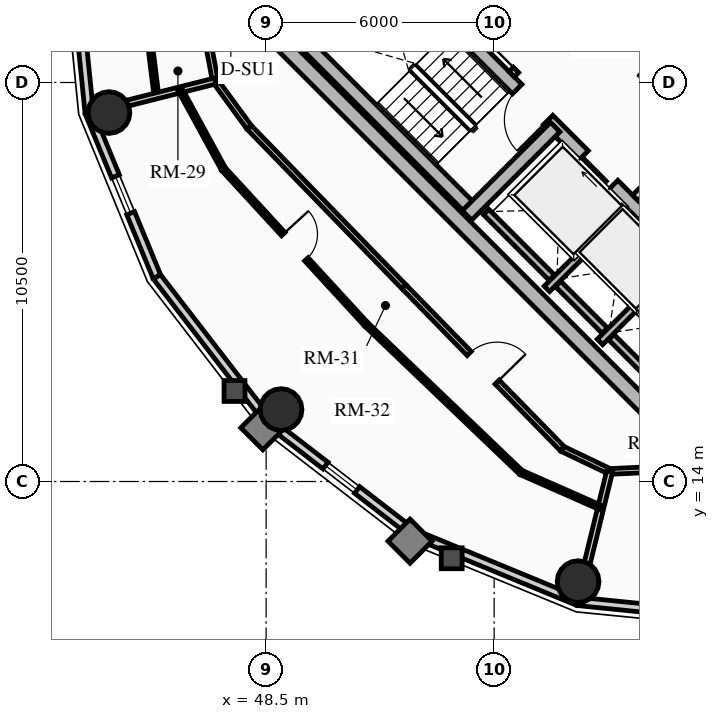
"""IFC4 building model, lengths in metres.
Left out: names, types, materials, properties, quantities, classifications, styles, units other than length and angle.
Written with IfcOpenShell. Run it as: python <this file> out.ifc"""

import sys

from ifc_helpers import new_model, si_unit, direction, frame, frame_2d, origin, origin_2d, place, context, subcontext, project, spatial, rectangle, circle, extrude, source, transform, mapped, element, fill, save


model = new_model("IFC4")
c1 = context("Model", 3, precision=1e-05, world=origin(), true_north=direction((0.0, 1.0)))
c2 = subcontext(c1, "Body", "Model", "MODEL_VIEW")
j1 = project(units=[si_unit("LENGTHUNIT", "METRE"), si_unit("PLANEANGLEUNIT", "RADIAN")], contexts=[c1])
p1 = place(None, origin())
s1 = spatial("IfcSite", under=j1, at=p1, CompositionType="ELEMENT")
p2 = place(p1, origin())
s2 = spatial("IfcBuilding", under=s1, at=p2, CompositionType="ELEMENT")
p3 = place(p2, frame((0.0, 0.0, 214.12)))
s3 = spatial("IfcBuildingStorey", under=s2, at=p3, CompositionType="ELEMENT", Elevation=214.12)
for number, where, z_axis, x_axis in (
    (1, (58.702, 15.732, 0.0), (0.0, 0.0, 1.0), (-0.707, 0.707, 0.0)),
    (2, (66.268, 23.298, 0.0), (0.0, 0.0, 1.0), (-0.707, 0.707, 0.0)),
):
    element("IfcWall", number, at=place(p3, frame(where, z_axis=z_axis, x_axis=x_axis)), inside=s3, PredefinedType="SHEAR", context=c2, shape_type="SweptSolid", body=[
        extrude(rectangle(XDim=14.1, YDim=0.4, at=frame_2d((7.05, 0.0))), origin(), (0.0, 0.0, 1.0), 2.91),
    ])
p4 = place(p3, frame((61.06, 18.373, 0.0), z_axis=(0.0, 0.0, 1.0), x_axis=(-0.707106781187, 0.707106781187, 0.0)))
e3 = element("IfcWall", 3, at=p4, inside=s3, PredefinedType="SHEAR", context=c2, shape_type="SweptSolid", body=[
    extrude(rectangle(XDim=13.7, YDim=0.35, at=frame_2d((6.85, 0.0))), origin(), (0.0, 0.0, 1.0), 2.91),
])
m1 = source(origin(), c2, "Body", "SweptSolid", [
    extrude(rectangle(XDim=1.1, YDim=2.015, at=frame_2d((0.55, 1.007))), frame((0.0, 0.185, 0.0), z_axis=(0.0, -1.0, 0.0), x_axis=(1.0, 0.0, 0.0)), (0.0, 0.0, 1.0), 0.37),
])
p5 = place(p4, frame((4.85, 0.0, 0.0)))
e4 = element("IfcOpeningElement", 4, at=p5, cuts=e3, PredefinedType="OPENING", context=c2, shape_type="MappedRepresentation", body=[
    mapped(m1, transform((0.0, 0.0, 0.0), x_axis=(1.0, 0.0, 0.0), y_axis=(0.0, 1.0, 0.0), z_axis=(0.0, 0.0, 1.0), scale=1.0)),
])
p6 = place(p4, frame((0.625, 0.0, 0.0)))
e5 = element("IfcOpeningElement", 5, at=p6, cuts=e3, PredefinedType="OPENING", context=c2, shape_type="MappedRepresentation", body=[
    mapped(m1, transform((0.0, 0.0, 0.0), x_axis=(1.0, 0.0, 0.0), y_axis=(0.0, 1.0, 0.0), z_axis=(0.0, 0.0, 1.0), scale=1.0)),
])
p7 = place(p4, frame((2.625, 0.0, 0.0)))
e6 = element("IfcOpeningElement", 6, at=p7, cuts=e3, PredefinedType="OPENING", context=c2, shape_type="MappedRepresentation", body=[
    mapped(m1, transform((0.0, 0.0, 0.0), x_axis=(1.0, 0.0, 0.0), y_axis=(0.0, 1.0, 0.0), z_axis=(0.0, 0.0, 1.0), scale=1.0)),
])
m2 = source(origin(), c2, "Body", "SweptSolid", [
    extrude(rectangle(XDim=1.15, YDim=2.02, at=frame_2d((0.575, 1.01))), frame((0.0, 0.185, 0.0), z_axis=(0.0, -1.0, 0.0), x_axis=(1.0, 0.0, 0.0)), (0.0, 0.0, 1.0), 0.37),
])
p8 = place(p4, frame((7.27, 0.0, 0.0)))
e7 = element("IfcOpeningElement", 7, at=p8, cuts=e3, PredefinedType="OPENING", context=c2, shape_type="MappedRepresentation", body=[
    mapped(m2, transform((0.0, 0.0, 0.0), x_axis=(1.0, 0.0, 0.0), y_axis=(0.0, 1.0, 0.0), z_axis=(0.0, 0.0, 1.0), scale=1.0)),
])
p9 = place(p3, frame((63.627, 20.94, 0.0), z_axis=(0.0, 0.0, 1.0), x_axis=(-0.707119496762, 0.707094065383, 0.0)))
e8 = element("IfcWall", 8, at=p9, inside=s3, PredefinedType="SHEAR", context=c2, shape_type="SweptSolid", body=[
    extrude(rectangle(XDim=9.6, YDim=0.35, at=frame_2d((4.8, 0.0))), origin(), (0.0, 0.0, 1.0), 2.91),
])
p10 = place(p9, frame((5.28, 0.0, 0.0)))
e9 = element("IfcOpeningElement", 9, at=p10, cuts=e8, PredefinedType="OPENING", context=c2, shape_type="MappedRepresentation", body=[
    mapped(m2, transform((0.0, 0.0, 0.0), x_axis=(1.0, 0.0, 0.0), y_axis=(0.0, 1.0, 0.0), z_axis=(0.0, 0.0, 1.0), scale=1.0)),
])
p11 = place(p3, frame((53.922, 21.141, 0.0), z_axis=(0.0, 0.0, 1.0), x_axis=(-0.707106781187, 0.707106781187, 0.0)))
e10 = element("IfcWall", 10, at=p11, inside=s3, PredefinedType="SHEAR", context=c2, shape_type="SweptSolid", body=[
    extrude(rectangle(XDim=6.695, YDim=0.35, at=frame_2d((3.348, 0.0))), origin(), (0.0, 0.0, 1.0), 2.91),
])
p12 = place(p3, frame((53.784, 21.003, 0.0), z_axis=(0.0, 0.0, 1.0), x_axis=(0.707106781187, 0.707106781187, 0.0)))
e11 = element("IfcWall", 11, at=p12, inside=s3, PredefinedType="SHEAR", context=c2, shape_type="SweptSolid", body=[
    extrude(rectangle(XDim=3.285, YDim=0.35, at=frame_2d((1.643, 0.0))), origin(), (0.0, 0.0, 1.0), 2.91),
])
for number, where, z_axis, x_axis in (
    (12, (44.365, 23.709, 0.0), (0.0, 0.0, 1.0), (1.0, 0.0, 0.0)),
    (13, (48.893, 15.893, 0.0), (0.0, 0.0, 1.0), (1.0, 0.0, 0.0)),
    (14, (56.709, 11.365, 0.0), (0.0, 0.0, 1.0), (1.0, 0.0, 0.0)),
):
    element("IfcColumn", number, at=place(p3, frame(where, z_axis=z_axis, x_axis=x_axis)), inside=s3, PredefinedType="USERDEFINED", context=c2, shape_type="SweptSolid", body=[
        extrude(circle(Radius=0.55, at=origin_2d()), origin(), (0.0, 0.0, 1.0), 2.91),
    ])
p13 = place(p3, frame((43.845, 23.705, 0.0), z_axis=(0.0, 0.0, 1.0), x_axis=(-0.100570534541, 0.994929930991, 0.0)))
e15 = element("IfcWall", 15, at=p13, inside=s3, PredefinedType="SOLIDWALL", context=c2, shape_type="SweptSolid", body=[
    extrude(rectangle(XDim=4.418, YDim=0.22, at=frame_2d((2.209, 0.0))), origin(), (0.0, 0.0, 1.0), 2.322),
])
m3 = source(origin(), c2, "Body", "SweptSolid", [
    extrude(rectangle(XDim=1.05, YDim=1.3, at=frame_2d((0.525, 0.65))), frame((0.0, 0.12, 0.0), z_axis=(0.0, -1.0, 0.0), x_axis=(1.0, 0.0, 0.0)), (0.0, 0.0, 1.0), 0.24),
])
p14 = place(p13, frame((1.684, 0.0, 0.65)))
e16 = element("IfcOpeningElement", 16, at=p14, cuts=e15, PredefinedType="OPENING", context=c2, shape_type="MappedRepresentation", body=[
    mapped(m3, transform((0.0, 0.0, 0.0), x_axis=(1.0, 0.0, 0.0), y_axis=(0.0, 1.0, 0.0), z_axis=(0.0, 0.0, 1.0), scale=1.0)),
])
p15 = place(p3, frame((45.626, 19.387, 0.0), z_axis=(0.0, 0.0, 1.0), x_axis=(-0.381309704956, 0.924447353237, 0.0)))
e17 = element("IfcWall", 17, at=p15, inside=s3, PredefinedType="SOLIDWALL", context=c2, shape_type="SweptSolid", body=[
    extrude(rectangle(XDim=4.671, YDim=0.22, at=frame_2d((2.335, 0.0))), origin(), (0.0, 0.0, 1.0), 2.322),
])
p16 = place(p15, frame((1.81, 0.0, 0.65)))
e18 = element("IfcOpeningElement", 18, at=p16, cuts=e17, PredefinedType="OPENING", context=c2, shape_type="MappedRepresentation", body=[
    mapped(m3, transform((0.0, 0.0, 0.0), x_axis=(1.0, 0.0, 0.0), y_axis=(0.0, 1.0, 0.0), z_axis=(0.0, 0.0, 1.0), scale=1.0)),
])
p17 = place(p3, frame((48.569, 15.569, 0.0), z_axis=(0.0, 0.0, 1.0), x_axis=(-0.610523083886, 0.791998462147, 0.0)))
e19 = element("IfcWall", 19, at=p17, inside=s3, PredefinedType="SOLIDWALL", context=c2, shape_type="SweptSolid", body=[
    extrude(rectangle(XDim=4.82, YDim=0.22, at=frame_2d((2.41, 0.0))), origin(), (0.0, 0.0, 1.0), 2.322),
])
p18 = place(p3, frame((52.387, 12.626, 0.0), z_axis=(0.0, 0.0, 1.0), x_axis=(-0.791998462147, 0.610523083886, 0.0)))
e20 = element("IfcWall", 20, at=p18, inside=s3, PredefinedType="SOLIDWALL", context=c2, shape_type="SweptSolid", body=[
    extrude(rectangle(XDim=4.82, YDim=0.22, at=frame_2d((2.41, 0.0))), origin(), (0.0, 0.0, 1.0), 2.322),
])
p19 = place(p18, frame((1.885, 0.0, 0.65)))
e21 = element("IfcOpeningElement", 21, at=p19, cuts=e20, PredefinedType="OPENING", context=c2, shape_type="MappedRepresentation", body=[
    mapped(m3, transform((0.0, 0.0, 0.0), x_axis=(1.0, 0.0, 0.0), y_axis=(0.0, 1.0, 0.0), z_axis=(0.0, 0.0, 1.0), scale=1.0)),
])
p20 = place(p3, frame((56.705, 10.845, 0.0), z_axis=(0.0, 0.0, 1.0), x_axis=(-0.924447353237, 0.381309704956, 0.0)))
e22 = element("IfcWall", 22, at=p20, inside=s3, PredefinedType="SOLIDWALL", context=c2, shape_type="SweptSolid", body=[
    extrude(rectangle(XDim=4.671, YDim=0.22, at=frame_2d((2.335, 0.0))), origin(), (0.0, 0.0, 1.0), 2.322),
])
p21 = place(p3, frame((61.1, 10.401, 0.0), z_axis=(0.0, 0.0, 1.0), x_axis=(-0.994929930991, 0.100570534541, 0.0)))
e23 = element("IfcWall", 23, at=p21, inside=s3, PredefinedType="SOLIDWALL", context=c2, shape_type="SweptSolid", body=[
    extrude(rectangle(XDim=4.418, YDim=0.22, at=frame_2d((2.209, 0.0))), origin(), (0.0, 0.0, 1.0), 2.322),
])
p22 = place(p21, frame((1.684, 0.0, 0.65)))
e24 = element("IfcOpeningElement", 24, at=p22, cuts=e23, PredefinedType="OPENING", context=c2, shape_type="MappedRepresentation", body=[
    mapped(m3, transform((0.0, 0.0, 0.0), x_axis=(1.0, 0.0, 0.0), y_axis=(0.0, 1.0, 0.0), z_axis=(0.0, 0.0, 1.0), scale=1.0)),
])
p23 = place(p3, frame((55.888, 19.069, 0.0), z_axis=(0.0, 0.0, 1.0), x_axis=(0.707106781187, 0.707106781187, 0.0)))
e25 = element("IfcWall", 25, at=p23, inside=s3, PredefinedType="SHEAR", context=c2, shape_type="SweptSolid", body=[
    extrude(rectangle(XDim=2.97, YDim=0.2, at=frame_2d((1.485, 0.0))), origin(), (0.0, 0.0, 1.0), 2.91),
])
p24 = place(p3, frame((56.015, 19.366, 0.0), z_axis=(0.0, 0.0, 1.0), x_axis=(-0.707106781187, 0.707106781187, 0.0)))
e26 = element("IfcWall", 26, at=p24, inside=s3, PredefinedType="SHEAR", context=c2, shape_type="SweptSolid", body=[
    extrude(rectangle(XDim=2.44, YDim=0.2, at=frame_2d((1.22, 0.0))), origin(), (0.0, 0.0, 1.0), 2.91),
])
p25 = place(p3, frame((57.284, 17.673, 0.0), z_axis=(0.0, 0.0, 1.0), x_axis=(0.707147878904, 0.70706568108, 0.0)))
e27 = element("IfcWall", 27, at=p25, inside=s3, PredefinedType="SHEAR", context=c2, shape_type="SweptSolid", body=[
    extrude(rectangle(XDim=2.97, YDim=0.2, at=frame_2d((1.485, 0.0))), origin(), (0.0, 0.0, 1.0), 2.91),
])
p26 = place(p3, frame((57.412, 17.97, 0.0), z_axis=(0.0, 0.0, 1.0), x_axis=(-0.707106781187, 0.707106781187, 0.0)))
e28 = element("IfcWall", 28, at=p26, inside=s3, PredefinedType="SHEAR", context=c2, shape_type="SweptSolid", body=[
    extrude(rectangle(XDim=1.735, YDim=0.2, at=frame_2d((0.867, 0.0))), origin(), (0.0, 0.0, 1.0), 2.91),
])
p27 = place(p3, frame((58.737, 16.644, 0.0), z_axis=(0.0, 0.0, 1.0), x_axis=(-0.707032117043, 0.707181437447, 0.0)))
e29 = element("IfcWall", 29, at=p27, inside=s3, PredefinedType="SHEAR", context=c2, shape_type="SweptSolid", body=[
    extrude(rectangle(XDim=1.635, YDim=0.2, at=frame_2d((0.817, 0.0))), origin(), (0.0, 0.0, 1.0), 2.91),
])
p28 = place(p3, frame((58.214, 21.467, 0.0), z_axis=(0.0, 0.0, 1.0), x_axis=(0.707106781187, 0.707106781187, 0.0)))
e30 = element("IfcWall", 30, at=p28, inside=s3, PredefinedType="PARTITIONING", context=c2, shape_type="SweptSolid", body=[
    extrude(rectangle(XDim=3.28, YDim=0.2, at=frame_2d((1.64, 0.0))), origin(), (0.0, 0.0, 1.0), 2.685),
])
m4 = source(origin(), c2, "Body", "SweptSolid", [
    extrude(rectangle(XDim=1.5, YDim=2.02, at=frame_2d((0.75, 1.01))), frame((0.0, 0.11, 0.0), z_axis=(0.0, -1.0, 0.0), x_axis=(1.0, 0.0, 0.0)), (0.0, 0.0, 1.0), 0.22),
])
p29 = place(p28, frame((1.55, 0.0, 0.0)))
e31 = element("IfcOpeningElement", 31, at=p29, cuts=e30, PredefinedType="OPENING", context=c2, shape_type="MappedRepresentation", body=[
    mapped(m4, transform((0.0, 0.0, 0.0), x_axis=(1.0, 0.0, 0.0), y_axis=(0.0, 1.0, 0.0), z_axis=(0.0, 0.0, 1.0), scale=1.0)),
])
p30 = place(p3, frame((54.961, 24.719, 0.0), z_axis=(0.0, 0.0, 1.0), x_axis=(0.707106781187, 0.707106781187, 0.0)))
e32 = element("IfcWall", 32, at=p30, inside=s3, PredefinedType="PARTITIONING", context=c2, shape_type="SweptSolid", body=[
    extrude(rectangle(XDim=3.28, YDim=0.2, at=frame_2d((1.64, 0.0))), origin(), (0.0, 0.0, 1.0), 2.685),
])
m5 = source(origin(), c2, "Body", "SweptSolid", [
    extrude(rectangle(XDim=0.9, YDim=2.005, at=frame_2d((0.45, 1.002))), frame((0.0, 0.11, 0.0), z_axis=(0.0, -1.0, 0.0), x_axis=(1.0, 0.0, 0.0)), (0.0, 0.0, 1.0), 0.22),
])
p31 = place(p30, frame((0.16, 0.0, 0.0)))
e33 = element("IfcOpeningElement", 33, at=p31, cuts=e32, PredefinedType="OPENING", context=c2, shape_type="MappedRepresentation", body=[
    mapped(m5, transform((0.0, 0.0, 0.0), x_axis=(1.0, 0.0, 0.0), y_axis=(0.0, 1.0, 0.0), z_axis=(0.0, 0.0, 1.0), scale=1.0)),
])
p32 = place(p3, frame((46.912, 25.862, 0.0), z_axis=(0.0, 0.0, 1.0), x_axis=(0.186095172215, -0.98253172309, 0.0)))
e34 = element("IfcWall", 34, at=p32, inside=s3, PredefinedType="PARTITIONING", context=c2, shape_type="SweptSolid", body=[
    extrude(rectangle(XDim=1.346, YDim=0.15, at=frame_2d((0.673, 0.0))), origin(), (0.0, 0.0, 1.0), 2.322),
])
p33 = place(p3, frame((47.163, 24.54, 0.0), z_axis=(0.0, 0.0, 1.0), x_axis=(0.589711902124, -0.807613690135, 0.0)))
e35 = element("IfcWall", 35, at=p33, inside=s3, PredefinedType="PARTITIONING", context=c2, shape_type="SweptSolid", body=[
    extrude(rectangle(XDim=1.507, YDim=0.15, at=frame_2d((0.753, 0.0))), origin(), (0.0, 0.0, 1.0), 2.255),
])
p34 = place(p3, frame((48.052, 23.323, 0.0), z_axis=(0.0, 0.0, 1.0), x_axis=(0.696573981306, -0.717484974454, 0.0)))
e36 = element("IfcWall", 36, at=p34, inside=s3, PredefinedType="PARTITIONING", context=c2, shape_type="SweptSolid", body=[
    extrude(rectangle(XDim=5.849, YDim=0.15, at=frame_2d((2.925, 0.0))), origin(), (0.0, 0.0, 1.0), 2.685),
])
p35 = place(p3, frame((52.126, 19.126, 0.0), z_axis=(0.0, 0.0, 1.0), x_axis=(0.698979087027, -0.715142108884, 0.0)))
e37 = element("IfcWall", 37, at=p35, inside=s3, PredefinedType="PARTITIONING", context=c2, shape_type="SweptSolid", body=[
    extrude(rectangle(XDim=5.966, YDim=0.15, at=frame_2d((2.983, 0.0))), origin(), (0.0, 0.0, 1.0), 2.322),
])
m6 = source(origin(), c2, "Body", "SweptSolid", [
    extrude(rectangle(XDim=1.05, YDim=2.015, at=frame_2d((0.525, 1.007))), frame((0.0, 0.085, 0.0), z_axis=(0.0, -1.0, 0.0), x_axis=(1.0, 0.0, 0.0)), (0.0, 0.0, 1.0), 0.17),
])
p36 = place(p35, frame((2.458, 0.0, 0.0)))
e38 = element("IfcOpeningElement", 38, at=p36, cuts=e37, PredefinedType="OPENING", context=c2, shape_type="MappedRepresentation", body=[
    mapped(m6, transform((0.0, 0.0, 0.0), x_axis=(1.0, 0.0, 0.0), y_axis=(0.0, 1.0, 0.0), z_axis=(0.0, 0.0, 1.0), scale=1.0)),
])
p37 = place(p3, frame((56.296, 14.859, 0.0), z_axis=(0.0, 0.0, 1.0), x_axis=(0.90178292445, -0.432189260823, 0.0)))
e39 = element("IfcWall", 39, at=p37, inside=s3, PredefinedType="PARTITIONING", context=c2, shape_type="SweptSolid", body=[
    extrude(rectangle(XDim=1.377, YDim=0.15, at=frame_2d((0.688, 0.0))), origin(), (0.0, 0.0, 1.0), 2.255),
])
p38 = place(p3, frame((57.538, 14.264, 0.0), z_axis=(0.0, 0.0, 1.0), x_axis=(0.99892990172, 0.046249880546, 0.0)))
e40 = element("IfcWall", 40, at=p38, inside=s3, PredefinedType="PARTITIONING", context=c2, shape_type="SweptSolid", body=[
    extrude(rectangle(XDim=1.446, YDim=0.15, at=frame_2d((0.723, 0.0))), origin(), (0.0, 0.0, 1.0), 2.322),
])
p39 = place(p3, frame((47.163, 24.54, 0.0), z_axis=(0.0, 0.0, 1.0), x_axis=(-0.9696166611, -0.244629373781, 0.0)))
e41 = element("IfcWall", 41, at=p39, inside=s3, PredefinedType="PARTITIONING", context=c2, shape_type="SweptSolid", body=[
    extrude(rectangle(XDim=3.401, YDim=0.16, at=frame_2d((1.701, 0.0))), origin(), (0.0, 0.0, 1.0), 2.322),
])
p40 = place(p3, frame((57.538, 14.264, 0.0), z_axis=(0.0, 0.0, 1.0), x_axis=(-0.237377006249, -0.971417601706, 0.0)))
e42 = element("IfcWall", 42, at=p40, inside=s3, PredefinedType="PARTITIONING", context=c2, shape_type="SweptSolid", body=[
    extrude(rectangle(XDim=3.499, YDim=0.16, at=frame_2d((1.75, 0.0))), origin(), (0.0, 0.0, 1.0), 2.322),
])
p41 = place(p3, frame((45.328, 26.457, 0.0), z_axis=(0.0, 0.0, 1.0), x_axis=(0.122605181354, -0.992455525203, 0.0)))
e43 = element("IfcWall", 43, at=p41, inside=s3, PredefinedType="PARTITIONING", context=c2, shape_type="SweptSolid", body=[
    extrude(rectangle(XDim=2.228, YDim=0.125, at=frame_2d((1.114, 0.0))), origin(), (0.0, 0.0, 1.0), 2.322),
])
m7 = source(origin(), c2, "Body", "SweptSolid", [
    extrude(rectangle(XDim=0.9, YDim=2.005, at=frame_2d((0.45, 1.002))), frame((0.0, 0.073, 0.0), z_axis=(0.0, -1.0, 0.0), x_axis=(1.0, 0.0, 0.0)), (0.0, 0.0, 1.0), 0.145),
])
p42 = place(p41, frame((0.12, 0.0, 0.0)))
e44 = element("IfcOpeningElement", 44, at=p42, cuts=e43, PredefinedType="OPENING", context=c2, shape_type="MappedRepresentation", body=[
    mapped(m7, transform((0.0, 0.0, 0.0), x_axis=(1.0, 0.0, 0.0), y_axis=(0.0, 1.0, 0.0), z_axis=(0.0, 0.0, 1.0), scale=1.0)),
])
p43 = place(p3, frame((46.24, 24.307, 0.0), z_axis=(0.0, 0.0, 1.0), x_axis=(0.479212341296, -0.87769899849, 0.0)))
e45 = element("IfcWall", 45, at=p43, inside=s3, PredefinedType="PARTITIONING", context=c2, shape_type="SweptSolid", body=[
    extrude(rectangle(XDim=2.374, YDim=0.125, at=frame_2d((1.187, 0.0))), origin(), (0.0, 0.0, 1.0), 2.255),
])
p44 = place(p3, frame((47.377, 22.223, 0.0), z_axis=(0.0, 0.0, 1.0), x_axis=(0.676554417653, -0.736392639802, 0.0)))
e46 = element("IfcWall", 46, at=p44, inside=s3, PredefinedType="PARTITIONING", context=c2, shape_type="SweptSolid", body=[
    extrude(rectangle(XDim=5.553, YDim=0.125, at=frame_2d((2.776, 0.0))), origin(), (0.0, 0.0, 1.0), 2.685),
])
p45 = place(p44, frame((2.326, 0.0, 0.0)))
e47 = element("IfcOpeningElement", 47, at=p45, cuts=e46, PredefinedType="OPENING", context=c2, shape_type="MappedRepresentation", body=[
    mapped(m7, transform((0.0, 0.0, 0.0), x_axis=(1.0, 0.0, 0.0), y_axis=(0.0, 1.0, 0.0), z_axis=(0.0, 0.0, 1.0), scale=1.0)),
])
p46 = place(p3, frame((51.134, 18.134, 0.0), z_axis=(0.0, 0.0, 1.0), x_axis=(0.722450775654, -0.691422357721, 0.0)))
e48 = element("IfcWall", 48, at=p46, inside=s3, PredefinedType="PARTITIONING", context=c2, shape_type="SweptSolid", body=[
    extrude(rectangle(XDim=5.634, YDim=0.125, at=frame_2d((2.817, 0.0))), origin(), (0.0, 0.0, 1.0), 2.322),
])
p47 = place(p3, frame((55.204, 14.239, 0.0), z_axis=(0.0, 0.0, 1.0), x_axis=(0.914999746908, -0.403454412738, 0.0)))
e49 = element("IfcWall", 49, at=p47, inside=s3, PredefinedType="PARTITIONING", context=c2, shape_type="SweptSolid", body=[
    extrude(rectangle(XDim=2.297, YDim=0.125, at=frame_2d((1.148, 0.0))), origin(), (0.0, 0.0, 1.0), 2.255),
])
m8 = source(origin(), c2, "Body", "SweptSolid", [
    extrude(rectangle(XDim=1.05, YDim=1.3, at=frame_2d((0.525, 0.65))), frame((0.0, 0.03, 0.0), z_axis=(0.0, -1.0, 0.0), x_axis=(1.0, 0.0, 0.0)), (0.0, 0.0, 1.0), 0.06),
])
p48 = place(p16, origin())
e50 = element("IfcWindow", 50, at=p48, inside=s3, PartitioningType="SINGLE_PANEL", PredefinedType="WINDOW", context=c2, shape_type="MappedRepresentation", body=[
    mapped(m8, transform((0.0, 0.0, 0.0), x_axis=(1.0, 0.0, 0.0), y_axis=(0.0, 1.0, 0.0), z_axis=(0.0, 0.0, 1.0), scale=1.0)),
])
fill(e18, e50)
p49 = place(p19, origin())
e51 = element("IfcWindow", 51, at=p49, inside=s3, PartitioningType="SINGLE_PANEL", PredefinedType="WINDOW", context=c2, shape_type="MappedRepresentation", body=[
    mapped(m8, transform((0.0, 0.0, 0.0), x_axis=(1.0, 0.0, 0.0), y_axis=(0.0, 1.0, 0.0), z_axis=(0.0, 0.0, 1.0), scale=1.0)),
])
fill(e21, e51)
m9 = source(origin(), c2, "Body", "SweptSolid", [
    extrude(rectangle(XDim=1.1, YDim=2.015, at=frame_2d((0.55, 1.007))), frame((0.0, 0.025, 0.0), z_axis=(0.0, -1.0, 0.0), x_axis=(1.0, 0.0, 0.0)), (0.0, 0.0, 1.0), 0.05),
])
p50 = place(p5, origin())
e52 = element("IfcDoor", 52, at=p50, inside=s3, OperationType="SLIDING_TO_RIGHT", PredefinedType="DOOR", context=c2, shape_type="MappedRepresentation", body=[
    mapped(m9, transform((0.0, 0.0, 0.0), x_axis=(1.0, 0.0, 0.0), y_axis=(0.0, 1.0, 0.0), z_axis=(0.0, 0.0, 1.0), scale=1.0)),
])
fill(e4, e52)
m10 = source(origin(), c2, "Body", "SweptSolid", [
    extrude(rectangle(XDim=1.15, YDim=2.02, at=frame_2d((0.575, 1.01))), frame((0.0, 0.025, 0.0), z_axis=(0.0, -1.0, 0.0), x_axis=(1.0, 0.0, 0.0)), (0.0, 0.0, 1.0), 0.05),
])
p51 = place(p8, origin())
e53 = element("IfcDoor", 53, at=p51, inside=s3, OperationType="SINGLE_SWING_LEFT", PredefinedType="DOOR", context=c2, shape_type="MappedRepresentation", body=[
    mapped(m10, transform((0.0, 0.0, 0.0), x_axis=(1.0, 0.0, 0.0), y_axis=(0.0, 1.0, 0.0), z_axis=(0.0, 0.0, 1.0), scale=1.0)),
])
fill(e7, e53)
m11 = source(origin(), c2, "Body", "SweptSolid", [
    extrude(rectangle(XDim=0.9, YDim=2.005, at=frame_2d((0.45, 1.002))), frame((0.0, 0.025, 0.0), z_axis=(0.0, -1.0, 0.0), x_axis=(1.0, 0.0, 0.0)), (0.0, 0.0, 1.0), 0.05),
])
p52 = place(p31, origin())
e54 = element("IfcDoor", 54, at=p52, inside=s3, OperationType="SINGLE_SWING_LEFT", PredefinedType="DOOR", context=c2, shape_type="MappedRepresentation", body=[
    mapped(m11, transform((0.0, 0.0, 0.0), x_axis=(1.0, 0.0, 0.0), y_axis=(0.0, 1.0, 0.0), z_axis=(0.0, 0.0, 1.0), scale=1.0)),
])
fill(e33, e54)
m12 = source(origin(), c2, "Body", "SweptSolid", [
    extrude(rectangle(XDim=1.05, YDim=2.015, at=frame_2d((0.525, 1.007))), frame((0.0, 0.025, 0.0), z_axis=(0.0, -1.0, 0.0), x_axis=(1.0, 0.0, 0.0)), (0.0, 0.0, 1.0), 0.05),
])
p53 = place(p36, origin())
e55 = element("IfcDoor", 55, at=p53, inside=s3, OperationType="SINGLE_SWING_RIGHT", PredefinedType="DOOR", context=c2, shape_type="MappedRepresentation", body=[
    mapped(m12, transform((0.0, 0.0, 0.0), x_axis=(1.0, 0.0, 0.0), y_axis=(0.0, 1.0, 0.0), z_axis=(0.0, 0.0, 1.0), scale=1.0)),
])
fill(e38, e55)
p54 = place(p45, origin())
e56 = element("IfcDoor", 56, at=p54, inside=s3, OperationType="SINGLE_SWING_LEFT", PredefinedType="DOOR", context=c2, shape_type="MappedRepresentation", body=[
    mapped(m11, transform((0.0, 0.0, 0.0), x_axis=(1.0, 0.0, 0.0), y_axis=(0.0, 1.0, 0.0), z_axis=(0.0, 0.0, 1.0), scale=1.0)),
])
fill(e47, e56)
save(model, sys.argv[1])
